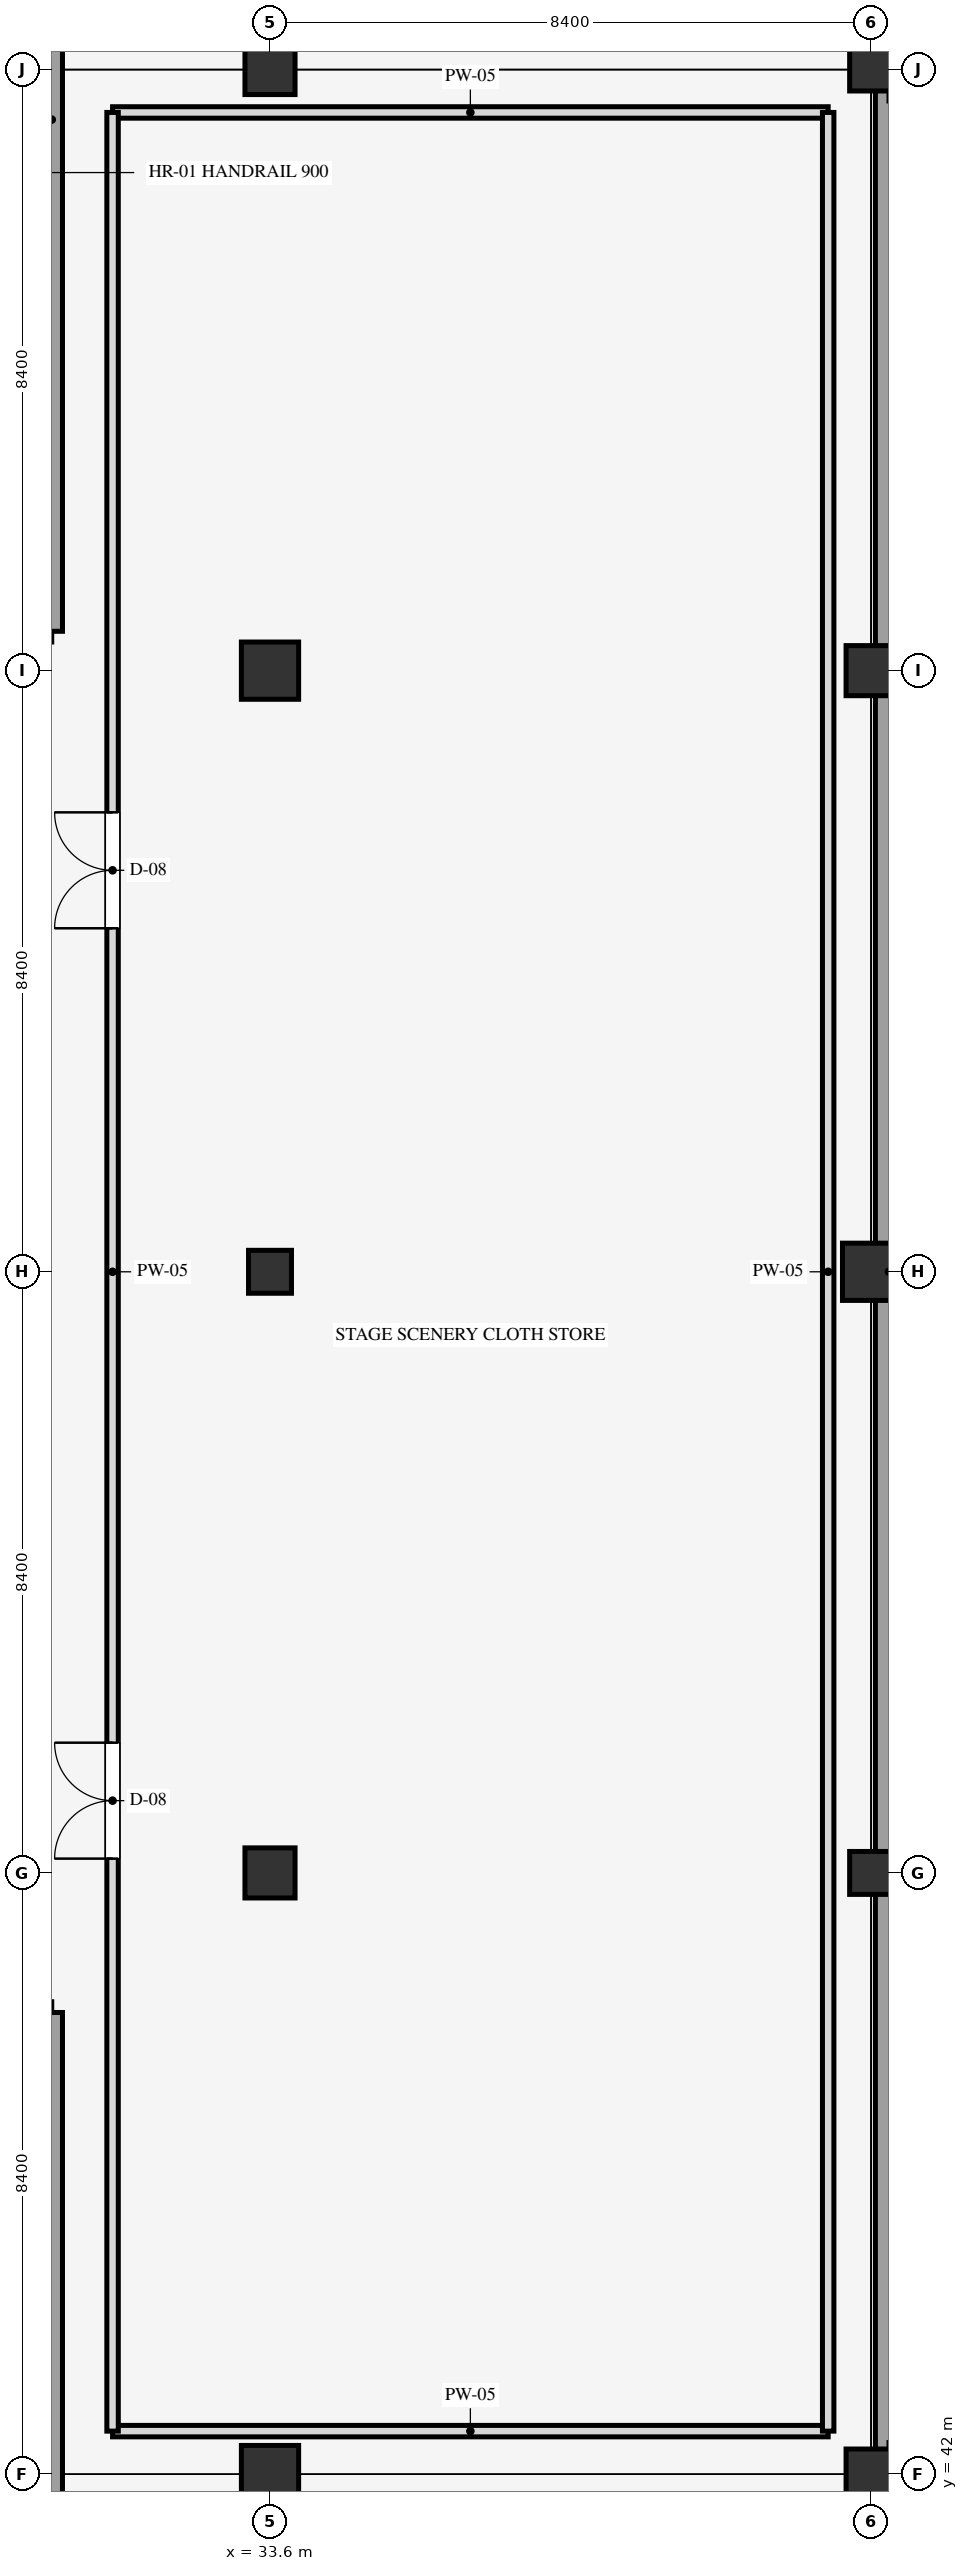
"""IFC4 building model, lengths in metres.
Left out: names, types, materials, properties, quantities, classifications, styles, units other than length and angle.
Written with IfcOpenShell. Run it as: python <this file> out.ifc"""

import sys

from ifc_helpers import new_model, si_unit, direction, frame, frame_2d, origin, origin_2d, place, context, subcontext, project, spatial, rectangle, extrude, element, fill, save


model = new_model("IFC4")
c1 = context("Model", 3, precision=1e-05, world=origin(), true_north=direction((0.0, 1.0)))
c2 = subcontext(c1, "Body", "Model", "MODEL_VIEW")
j1 = project(units=[si_unit("LENGTHUNIT", "METRE"), si_unit("PLANEANGLEUNIT", "RADIAN")], contexts=[c1])
p1 = place(None, origin())
s1 = spatial("IfcSite", under=j1, at=p1, CompositionType="ELEMENT")
p2 = place(p1, origin())
s2 = spatial("IfcBuilding", under=s1, at=p2, CompositionType="ELEMENT")
p3 = place(p2, frame((0.0, 0.0, 9.9)))
s3 = spatial("IfcBuildingStorey", under=s2, at=p3, CompositionType="ELEMENT", Elevation=9.9)
p4 = place(p3, frame((33.6, 42.0, 0.0), z_axis=(0.0, 0.0, 1.0), x_axis=(1.0, 0.0, 0.0)))
e1 = element("IfcColumn", 1, at=p4, inside=s3, PredefinedType="COLUMN", context=c2, shape_type="SweptSolid", body=[
    extrude(rectangle(XDim=0.8, YDim=0.8, at=origin_2d()), origin(), (0.0, 0.0, 1.0), 4.5),
])
p5 = place(p3, frame((33.6, 50.4, 0.0), z_axis=(0.0, 0.0, 1.0), x_axis=(1.0, 0.0, 0.0)))
e2 = element("IfcColumn", 2, at=p5, inside=s3, PredefinedType="COLUMN", context=c2, shape_type="SweptSolid", body=[
    extrude(rectangle(XDim=0.7, YDim=0.7, at=origin_2d()), origin(), (0.0, 0.0, 1.0), 4.5),
])
p6 = place(p3, frame((33.6, 58.8, 0.0), z_axis=(0.0, 0.0, 1.0), x_axis=(1.0, 0.0, 0.0)))
e3 = element("IfcColumn", 3, at=p6, inside=s3, PredefinedType="COLUMN", context=c2, shape_type="SweptSolid", body=[
    extrude(rectangle(XDim=0.6, YDim=0.6, at=origin_2d()), origin(), (0.0, 0.0, 1.0), 4.5),
])
p7 = place(p3, frame((33.6, 67.2, 0.0), z_axis=(0.0, 0.0, 1.0), x_axis=(1.0, 0.0, 0.0)))
e4 = element("IfcColumn", 4, at=p7, inside=s3, PredefinedType="COLUMN", context=c2, shape_type="SweptSolid", body=[
    extrude(rectangle(XDim=0.8, YDim=0.8, at=origin_2d()), origin(), (0.0, 0.0, 1.0), 4.5),
])
for number, where, z_axis, x_axis in (
    (5, (33.6, 75.6, 0.0), (0.0, 0.0, 1.0), (1.0, 0.0, 0.0)),
    (6, (42.0, 42.0, 0.0), (0.0, 0.0, 1.0), (1.0, 0.0, 0.0)),
):
    element("IfcColumn", number, at=place(p3, frame(where, z_axis=z_axis, x_axis=x_axis)), inside=s3, PredefinedType="COLUMN", context=c2, shape_type="SweptSolid", body=[
        extrude(rectangle(XDim=0.7, YDim=0.7, at=origin_2d()), origin(), (0.0, 0.0, 1.0), 4.5),
    ])
p8 = place(p3, frame((42.0, 50.4, 0.0), z_axis=(0.0, 0.0, 1.0), x_axis=(1.0, 0.0, 0.0)))
e7 = element("IfcColumn", 7, at=p8, inside=s3, PredefinedType="COLUMN", context=c2, shape_type="SweptSolid", body=[
    extrude(rectangle(XDim=0.6, YDim=0.6, at=origin_2d()), origin(), (0.0, 0.0, 1.0), 4.5),
])
p9 = place(p3, frame((42.0, 58.8, 0.0), z_axis=(0.0, 0.0, 1.0), x_axis=(1.0, 0.0, 0.0)))
e8 = element("IfcColumn", 8, at=p9, inside=s3, PredefinedType="COLUMN", context=c2, shape_type="SweptSolid", body=[
    extrude(rectangle(XDim=0.8, YDim=0.8, at=origin_2d()), origin(), (0.0, 0.0, 1.0), 4.5),
])
p10 = place(p3, frame((42.0, 67.2, 0.0), z_axis=(0.0, 0.0, 1.0), x_axis=(1.0, 0.0, 0.0)))
e9 = element("IfcColumn", 9, at=p10, inside=s3, PredefinedType="COLUMN", context=c2, shape_type="SweptSolid", body=[
    extrude(rectangle(XDim=0.7, YDim=0.7, at=origin_2d()), origin(), (0.0, 0.0, 1.0), 4.5),
])
p11 = place(p3, frame((42.0, 75.6, 0.0), z_axis=(0.0, 0.0, 1.0), x_axis=(1.0, 0.0, 0.0)))
e10 = element("IfcColumn", 10, at=p11, inside=s3, PredefinedType="COLUMN", context=c2, shape_type="SweptSolid", body=[
    extrude(rectangle(XDim=0.6, YDim=0.6, at=origin_2d()), origin(), (0.0, 0.0, 1.0), 4.5),
])
for number, where, z_axis, x_axis in (
    (11, (30.55, 34.15, 0.0), (0.0, 0.0, 1.0), (0.0, 1.0, 0.0)),
    (12, (30.55, 67.75, 0.0), (0.0, 0.0, 1.0), (0.0, 1.0, 0.0)),
):
    element("IfcWall", number, at=place(p3, frame(where, z_axis=z_axis, x_axis=x_axis)), inside=s3, PredefinedType="SHEAR", context=c2, shape_type="SweptSolid", body=[
        extrude(rectangle(XDim=14.3, YDim=0.3, at=frame_2d((7.15, 0.0))), origin(), (0.0, 0.0, 1.0), 4.5),
    ])
p12 = place(p3, frame((42.25, 42.25, 0.0), z_axis=(0.0, 0.0, 1.0), x_axis=(0.0, 1.0, 0.0)))
e13 = element("IfcWall", 13, at=p12, inside=s3, PredefinedType="SHEAR", context=c2, shape_type="SweptSolid", body=[
    extrude(rectangle(XDim=33.1, YDim=0.38, at=frame_2d((16.55, 0.0))), origin(), (0.0, 0.0, 1.0), 4.2),
])
for number, where, z_axis, x_axis in (
    (14, (31.4, 42.6, 0.0), (0.0, 0.0, 1.0), (1.0, 0.0, 0.0)),
    (15, (31.4, 75.0, 0.0), (0.0, 0.0, 1.0), (1.0, 0.0, 0.0)),
):
    element("IfcWall", number, at=place(p3, frame(where, z_axis=z_axis, x_axis=x_axis)), inside=s3, PredefinedType="PARTITIONING", context=c2, shape_type="SweptSolid", body=[
        extrude(rectangle(XDim=10.0, YDim=0.16, at=frame_2d((5.0, 0.0))), origin(), (0.0, 0.0, 1.0), 3.54),
    ])
p13 = place(p3, frame((31.4, 42.6, 0.0), z_axis=(0.0, 0.0, 1.0), x_axis=(0.0, 1.0, 0.0)))
e16 = element("IfcWall", 16, at=p13, inside=s3, PredefinedType="PARTITIONING", context=c2, shape_type="SweptSolid", body=[
    extrude(rectangle(XDim=32.4, YDim=0.16, at=frame_2d((16.2, 0.0))), origin(), (0.0, 0.0, 1.0), 3.54),
])
p14 = place(p13, frame((8.0, 0.0, 0.0)))
e17 = element("IfcOpeningElement", 17, at=p14, cuts=e16, PredefinedType="OPENING", context=c2, shape_type="SweptSolid", body=[
    extrude(rectangle(XDim=1.62, YDim=2.22, at=frame_2d((0.81, 1.11))), frame((0.0, 0.09, 0.0), z_axis=(0.0, -1.0, 0.0), x_axis=(1.0, 0.0, 0.0)), (0.0, 0.0, 1.0), 0.18),
])
p15 = place(p13, frame((21.0, 0.0, 0.0)))
e18 = element("IfcOpeningElement", 18, at=p15, cuts=e16, PredefinedType="OPENING", context=c2, shape_type="SweptSolid", body=[
    extrude(rectangle(XDim=1.62, YDim=2.22, at=frame_2d((0.81, 1.11))), frame((0.0, 0.09, 0.0), z_axis=(0.0, -1.0, 0.0), x_axis=(1.0, 0.0, 0.0)), (0.0, 0.0, 1.0), 0.18),
])
p16 = place(p3, frame((41.4, 42.6, 0.0), z_axis=(0.0, 0.0, 1.0), x_axis=(0.0, 1.0, 0.0)))
e19 = element("IfcWall", 19, at=p16, inside=s3, PredefinedType="PARTITIONING", context=c2, shape_type="SweptSolid", body=[
    extrude(rectangle(XDim=32.4, YDim=0.16, at=frame_2d((16.2, 0.0))), origin(), (0.0, 0.0, 1.0), 3.54),
])
p17 = place(p14, origin())
e20 = element("IfcDoor", 20, at=p17, inside=s3, OperationType="DOUBLE_DOOR_SINGLE_SWING", PredefinedType="DOOR", context=c2, shape_type="SweptSolid", body=[
    extrude(rectangle(XDim=1.62, YDim=2.22, at=frame_2d((0.81, 1.11))), frame((0.0, 0.025, 0.0), z_axis=(0.0, -1.0, 0.0), x_axis=(1.0, 0.0, 0.0)), (0.0, 0.0, 1.0), 0.05),
])
fill(e17, e20)
p18 = place(p15, origin())
e21 = element("IfcDoor", 21, at=p18, inside=s3, OperationType="DOUBLE_DOOR_SINGLE_SWING", PredefinedType="DOOR", context=c2, shape_type="SweptSolid", body=[
    extrude(rectangle(XDim=1.62, YDim=2.22, at=frame_2d((0.81, 1.11))), frame((0.0, 0.025, 0.0), z_axis=(0.0, -1.0, 0.0), x_axis=(1.0, 0.0, 0.0)), (0.0, 0.0, 1.0), 0.05),
])
fill(e18, e21)
save(model, sys.argv[1])
